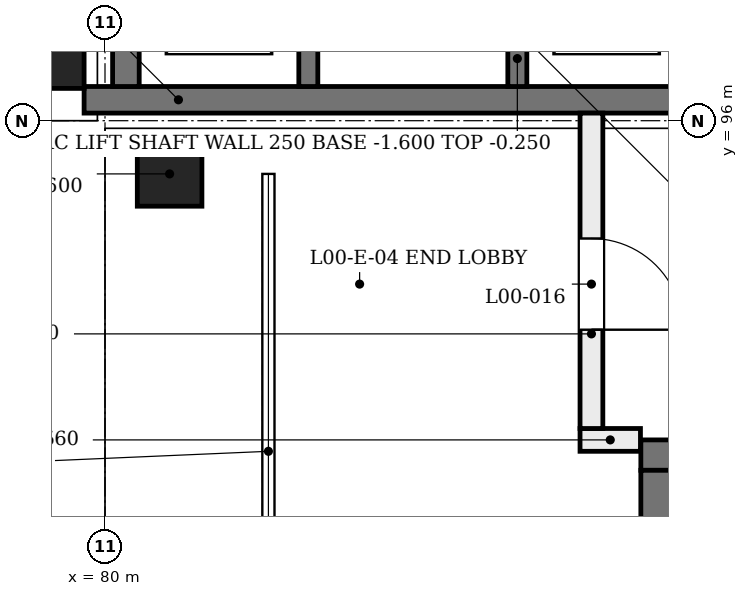
"""IFC4 building model, lengths in metres.
Left out: names, types, materials, properties, quantities, classifications, styles, units other than length and angle.
Written with IfcOpenShell. Run it as: python <this file> out.ifc"""

import sys

from ifc_helpers import new_model, si_unit, direction, frame, frame_2d, origin, origin_2d, place, context, subcontext, project, spatial, rectangle, extrude, element, fill, save


model = new_model("IFC4")
c1 = context("Model", 3, precision=1e-05, world=origin(), true_north=direction((0.0, 1.0)))
c2 = subcontext(c1, "Body", "Model", "MODEL_VIEW")
j1 = project(units=[si_unit("LENGTHUNIT", "METRE"), si_unit("PLANEANGLEUNIT", "RADIAN")], contexts=[c1])
p1 = place(None, origin())
s1 = spatial("IfcSite", under=j1, at=p1, CompositionType="ELEMENT")
p2 = place(p1, origin())
s2 = spatial("IfcBuilding", under=s1, at=p2, CompositionType="ELEMENT")
p3 = place(p2, origin())
s3 = spatial("IfcBuildingStorey", under=s2, at=p3, CompositionType="ELEMENT", Elevation=0.0)
p4 = place(p3, frame((87.05, 91.6, -1.6), z_axis=(0.0, 0.0, 1.0), x_axis=(1.0, 0.0, 0.0)))
e1 = element("IfcWall", 1, at=p4, inside=s3, PredefinedType="SHEAR", context=c2, shape_type="SweptSolid", body=[
    extrude(rectangle(XDim=8.55, YDim=0.4, at=frame_2d((4.275, 0.0))), origin(), (0.0, 0.0, 1.0), 6.18),
])
p5 = place(p3, frame((87.25, 75.8, -1.6), z_axis=(0.0, 0.0, 1.0), x_axis=(0.0, 1.0, 0.0)))
e2 = element("IfcWall", 2, at=p5, inside=s3, PredefinedType="SHEAR", context=c2, shape_type="SweptSolid", body=[
    extrude(rectangle(XDim=15.6, YDim=0.4, at=frame_2d((7.8, 0.0))), origin(), (0.0, 0.0, 1.0), 6.18),
])
p6 = place(p5, frame((6.987, 0.0, 1.6)))
e3 = element("IfcOpeningElement", 3, at=p6, cuts=e2, PredefinedType="OPENING", context=c2, shape_type="SweptSolid", body=[
    extrude(rectangle(XDim=1.4, YDim=2.4, at=frame_2d((0.7, 1.2))), frame((0.0, 0.21, 0.0), z_axis=(0.0, -1.0, 0.0), x_axis=(1.0, 0.0, 0.0)), (0.0, 0.0, 1.0), 0.42),
])
p7 = place(p3, frame((79.725, 96.275, -1.6), z_axis=(0.0, 0.0, 1.0), x_axis=(1.0, 0.0, 0.0)))
e4 = element("IfcWall", 4, at=p7, inside=s3, PredefinedType="SHEAR", context=c2, shape_type="SweptSolid", body=[
    extrude(rectangle(XDim=8.275, YDim=0.35, at=frame_2d((4.137, 0.0))), origin(), (0.0, 0.0, 1.0), 6.18),
])
p8 = place(p3, frame((80.275, 96.45, -1.6), z_axis=(0.0, 0.0, 1.0), x_axis=(0.0, 1.0, 0.0)))
e5 = element("IfcWall", 5, at=p8, inside=s3, PredefinedType="SHEAR", context=c2, shape_type="SweptSolid", body=[
    extrude(rectangle(XDim=15.2, YDim=0.35, at=frame_2d((7.6, 0.0))), origin(), (0.0, 0.0, 1.0), 6.18),
])
p9 = place(p8, frame((13.1, 0.0, 1.6)))
e6 = element("IfcOpeningElement", 6, at=p9, cuts=e5, PredefinedType="OPENING", context=c2, shape_type="SweptSolid", body=[
    extrude(rectangle(XDim=1.0, YDim=2.1, at=frame_2d((0.5, 1.05))), frame((0.0, 0.185, 0.0), z_axis=(0.0, -1.0, 0.0), x_axis=(1.0, 0.0, 0.0)), (0.0, 0.0, 1.0), 0.37),
])
p10 = place(p8, frame((3.2, 0.0, 1.6)))
e7 = element("IfcOpeningElement", 7, at=p10, cuts=e5, PredefinedType="OPENING", context=c2, shape_type="SweptSolid", body=[
    extrude(rectangle(XDim=1.4, YDim=2.1, at=frame_2d((0.7, 1.05))), frame((0.0, 0.185, 0.0), z_axis=(0.0, -1.0, 0.0), x_axis=(1.0, 0.0, 0.0)), (0.0, 0.0, 1.0), 0.37),
])
for number, where, z_axis, x_axis in (
    (8, (79.3, 96.267, -1.6), (0.0, 0.204, 0.979), (-1.0, 0.0, 0.0)),
    (9, (80.267, 95.3, -1.6), (0.204, 0.0, 0.979), (0.0, 1.0, 0.0)),
    (10, (87.667, 95.3, -1.6), (0.204, 0.0, 0.979), (0.0, 1.0, 0.0)),
):
    element("IfcColumn", number, at=place(p3, frame(where, z_axis=z_axis, x_axis=x_axis)), inside=s3, PredefinedType="COLUMN", context=c2, shape_type="SweptSolid", body=[
        extrude(rectangle(XDim=0.85, YDim=0.85, at=origin_2d()), origin(), (0.0, 0.0, 1.0), 6.538),
    ])
p11 = place(p3, frame((82.15, 88.2, 4.1), z_axis=(0.0, 0.0, 1.0), x_axis=(0.0, 1.0, 0.0)))
e11 = element("IfcWall", 11, at=p11, inside=s3, PredefinedType="SOLIDWALL", context=c2, shape_type="SweptSolid", body=[
    extrude(rectangle(XDim=6.9, YDim=0.15, at=frame_2d((3.45, 0.0))), origin(), (0.0, 0.0, 1.0), 0.48),
])
p12 = place(p3, frame((85.425, 98.9, 0.0), z_axis=(0.0, 0.0, 1.0), x_axis=(0.0, -1.0, 0.0)))
e12 = element("IfcWall", 12, at=p12, inside=s3, PredefinedType="SOLIDWALL", context=c2, shape_type="SweptSolid", body=[
    extrude(rectangle(XDim=2.45, YDim=0.25, at=frame_2d((1.225, 0.0))), origin(), (0.0, 0.0, 1.0), 4.55),
])
p13 = place(p3, frame((85.425, 98.9, -1.6), z_axis=(0.0, 0.0, 1.0), x_axis=(0.0, -1.0, 0.0)))
e13 = element("IfcWall", 13, at=p13, inside=s3, PredefinedType="SOLIDWALL", context=c2, shape_type="SweptSolid", body=[
    extrude(rectangle(XDim=2.45, YDim=0.25, at=frame_2d((1.225, 0.0))), origin(), (0.0, 0.0, 1.0), 1.35),
])
p14 = place(p3, frame((82.675, 98.9, 0.0), z_axis=(0.0, 0.0, 1.0), x_axis=(0.0, -1.0, 0.0)))
e14 = element("IfcWall", 14, at=p14, inside=s3, PredefinedType="SOLIDWALL", context=c2, shape_type="SweptSolid", body=[
    extrude(rectangle(XDim=2.45, YDim=0.25, at=frame_2d((1.225, 0.0))), origin(), (0.0, 0.0, 1.0), 4.55),
])
p15 = place(p3, frame((82.675, 98.9, -1.6), z_axis=(0.0, 0.0, 1.0), x_axis=(0.0, -1.0, 0.0)))
e15 = element("IfcWall", 15, at=p15, inside=s3, PredefinedType="SOLIDWALL", context=c2, shape_type="SweptSolid", body=[
    extrude(rectangle(XDim=2.45, YDim=0.25, at=frame_2d((1.225, 0.0))), origin(), (0.0, 0.0, 1.0), 1.35),
])
p16 = place(p3, frame((86.25, 91.8, 0.0), z_axis=(0.0, 0.0, 1.0), x_axis=(1.0, 0.0, 0.0)))
e16 = element("IfcWall", 16, at=p16, inside=s3, PredefinedType="PARTITIONING", context=c2, shape_type="SweptSolid", body=[
    extrude(rectangle(XDim=0.795, YDim=0.3, at=frame_2d((0.397, 0.0))), origin(), (0.0, 0.0, 1.0), 4.56),
])
p17 = place(p3, frame((86.4, 91.95, 0.0), z_axis=(0.0, 0.0, 1.0), x_axis=(0.0, 1.0, 0.0)))
e17 = element("IfcWall", 17, at=p17, inside=s3, PredefinedType="PARTITIONING", context=c2, shape_type="SweptSolid", body=[
    extrude(rectangle(XDim=4.15, YDim=0.3, at=frame_2d((2.075, 0.0))), origin(), (0.0, 0.0, 1.0), 3.88),
])
p18 = place(p17, frame((1.3, 0.0, 0.0)))
e18 = element("IfcOpeningElement", 18, at=p18, cuts=e17, PredefinedType="OPENING", context=c2, shape_type="SweptSolid", body=[
    extrude(rectangle(XDim=1.2, YDim=2.2, at=frame_2d((0.6, 1.1))), frame((0.0, 0.16, 0.0), z_axis=(0.0, -1.0, 0.0), x_axis=(1.0, 0.0, 0.0)), (0.0, 0.0, 1.0), 0.32),
])
p19 = place(p18, frame((1.2, 0.0, 0.0), z_axis=(0.0, 0.0, 1.0), x_axis=(-1.0, 0.0, 0.0)))
e19 = element("IfcDoor", 19, at=p19, inside=s3, OperationType="SINGLE_SWING_LEFT", PredefinedType="DOOR", context=c2, shape_type="SweptSolid", body=[
    extrude(rectangle(XDim=1.2, YDim=2.2, at=frame_2d((0.6, 1.1))), frame((0.0, 0.025, 0.0), z_axis=(0.0, -1.0, 0.0), x_axis=(1.0, 0.0, 0.0)), (0.0, 0.0, 1.0), 0.05),
])
fill(e18, e19)
save(model, sys.argv[1])
